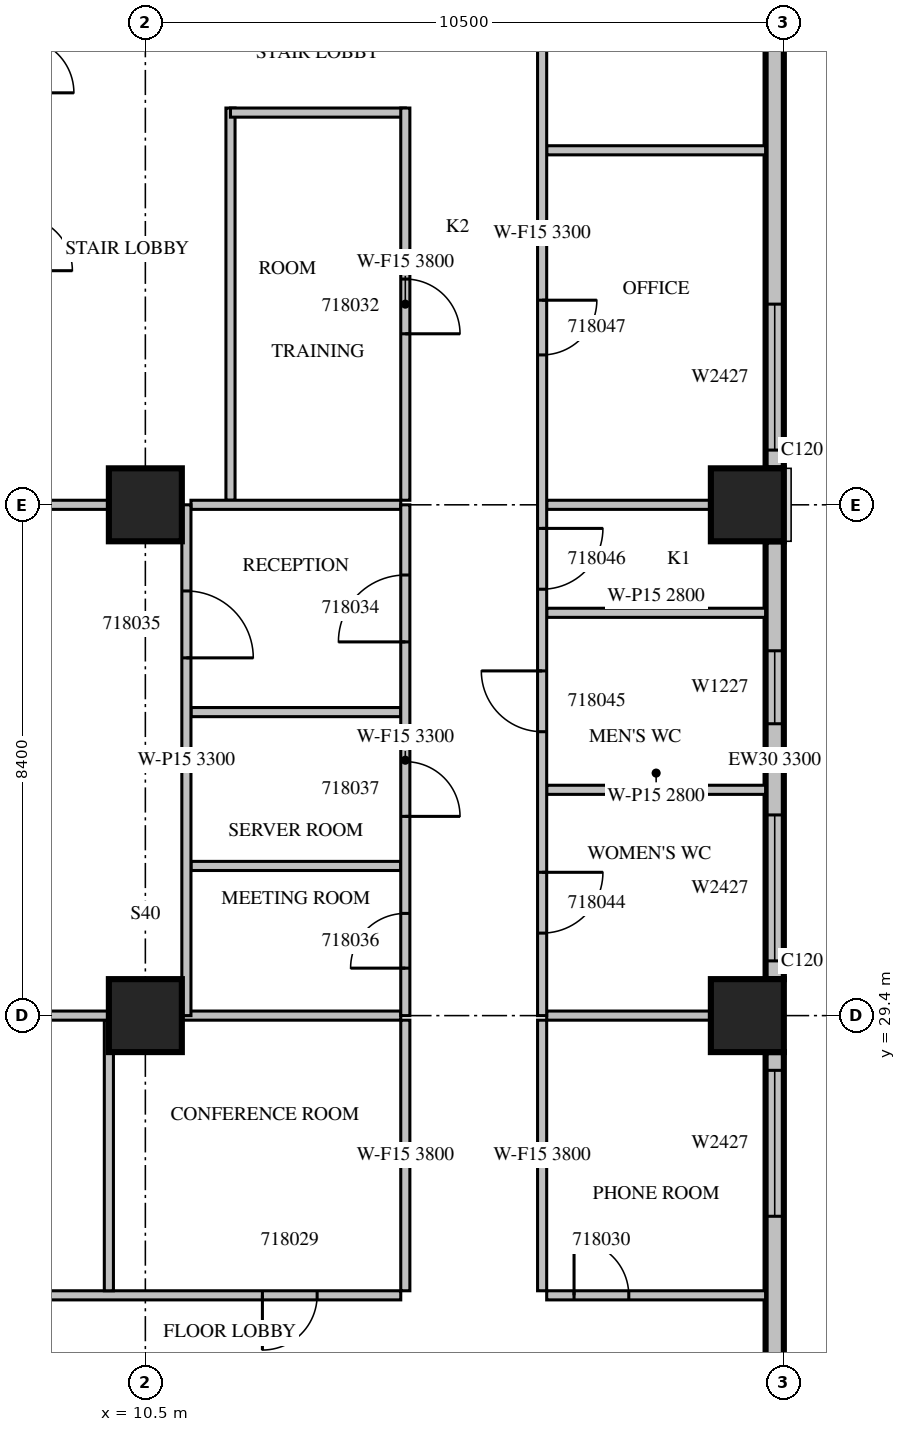
"""IFC4 building model, lengths in metres.
Left out: names, types, materials, properties, quantities, classifications, styles, units other than length and angle.
Written with IfcOpenShell. Run it as: python <this file> out.ifc"""

import sys

from ifc_helpers import new_model, si_unit, direction, frame, frame_2d, origin, origin_2d, place, context, subcontext, project, spatial, rectangle, extrude, source, transform, mapped, element, fill, save


model = new_model("IFC4")
c1 = context("Model", 3, precision=1e-05, world=origin(), true_north=direction((0.0, 1.0)))
c2 = subcontext(c1, "Body", "Model", "MODEL_VIEW")
j1 = project(units=[si_unit("LENGTHUNIT", "METRE"), si_unit("PLANEANGLEUNIT", "RADIAN")], contexts=[c1])
p1 = place(None, origin())
s1 = spatial("IfcSite", under=j1, at=p1, CompositionType="ELEMENT")
p2 = place(p1, origin())
s2 = spatial("IfcBuilding", under=s1, at=p2, CompositionType="ELEMENT")
p3 = place(p2, frame((0.0, 0.0, 86.7)))
s3 = spatial("IfcBuildingStorey", under=s2, at=p3, CompositionType="ELEMENT", Elevation=86.7)
m1 = source(origin(), c2, "Body", "SweptSolid", [
    extrude(rectangle(XDim=1.2, YDim=1.2, at=origin_2d()), origin(), (0.0, 0.0, 1.0), 4.2),
])
for number, where, z_axis, x_axis in (
    (1, (10.5, 29.4, 0.0), (0.0, 0.0, 1.0), (1.0, 0.0, 0.0)),
    (2, (20.4, 29.4, 0.0), (0.0, 0.0, 1.0), (1.0, 0.0, 0.0)),
    (3, (10.5, 37.8, 0.0), (0.0, 0.0, 1.0), (1.0, 0.0, 0.0)),
    (4, (20.4, 37.8, 0.0), (0.0, 0.0, 1.0), (1.0, 0.0, 0.0)),
):
    element("IfcColumn", number, at=place(p3, frame(where, z_axis=z_axis, x_axis=x_axis)), inside=s3, PredefinedType="COLUMN", context=c2, shape_type="MappedRepresentation", body=[
        mapped(m1, transform((0.0, 0.0, 0.0), scale=1.0)),
    ])
m2 = source(origin(), c2, "Body", "SweptSolid", [
    extrude(rectangle(XDim=6.6, YDim=0.3, at=frame_2d((3.3, 0.0))), origin(), (0.0, 0.0, 1.0), 3.8),
])
p4 = place(p3, frame((20.85, 22.2, 0.0), z_axis=(0.0, 0.0, 1.0), x_axis=(0.0, 1.0, 0.0)))
e5 = element("IfcWall", 5, at=p4, inside=s3, PredefinedType="STANDARD", context=c2, shape_type="MappedRepresentation", body=[
    mapped(m2, transform((0.0, 0.0, 0.0), scale=1.0)),
])
m3 = source(origin(), c2, "Body", "SweptSolid", [
    extrude(rectangle(XDim=1.2, YDim=2.7, at=frame_2d((0.6, 1.35))), frame((0.0, 0.16, 0.0), z_axis=(0.0, -1.0, 0.0), x_axis=(1.0, 0.0, 0.0)), (0.0, 0.0, 1.0), 0.32),
])
p5 = place(p4, frame((0.3, 0.0, 0.6)))
e6 = element("IfcOpeningElement", 6, at=p5, cuts=e5, PredefinedType="OPENING", context=c2, shape_type="MappedRepresentation", body=[
    mapped(m3, transform((0.0, 0.0, 0.0), scale=1.0)),
])
m4 = source(origin(), c2, "Body", "SweptSolid", [
    extrude(rectangle(XDim=2.4, YDim=2.7, at=frame_2d((1.2, 1.35))), frame((0.0, 0.16, 0.0), z_axis=(0.0, -1.0, 0.0), x_axis=(1.0, 0.0, 0.0)), (0.0, 0.0, 1.0), 0.32),
])
p6 = place(p4, frame((3.9, 0.0, 0.6)))
e7 = element("IfcOpeningElement", 7, at=p6, cuts=e5, PredefinedType="OPENING", context=c2, shape_type="MappedRepresentation", body=[
    mapped(m4, transform((0.0, 0.0, 0.0), scale=1.0)),
])
m5 = source(origin(), c2, "Body", "SweptSolid", [
    extrude(rectangle(XDim=7.2, YDim=0.3, at=frame_2d((3.6, 0.0))), origin(), (0.0, 0.0, 1.0), 3.3),
])
p7 = place(p3, frame((20.85, 30.0, 0.0), z_axis=(0.0, 0.0, 1.0), x_axis=(0.0, 1.0, 0.0)))
e8 = element("IfcWall", 8, at=p7, inside=s3, PredefinedType="STANDARD", context=c2, shape_type="MappedRepresentation", body=[
    mapped(m5, transform((0.0, 0.0, 0.0), scale=1.0)),
])
p8 = place(p7, frame((0.3, 0.0, 0.6)))
e9 = element("IfcOpeningElement", 9, at=p8, cuts=e8, PredefinedType="OPENING", context=c2, shape_type="MappedRepresentation", body=[
    mapped(m4, transform((0.0, 0.0, 0.0), scale=1.0)),
])
p9 = place(p7, frame((4.199, 0.0, 0.6)))
e10 = element("IfcOpeningElement", 10, at=p9, cuts=e8, PredefinedType="OPENING", context=c2, shape_type="MappedRepresentation", body=[
    mapped(m3, transform((0.0, 0.0, 0.0), scale=1.0)),
])
m6 = source(origin(), c2, "Body", "SweptSolid", [
    extrude(rectangle(XDim=7.2, YDim=0.3, at=frame_2d((3.6, 0.0))), origin(), (0.0, 0.0, 1.0), 3.8),
])
p10 = place(p3, frame((20.85, 38.4, 0.0), z_axis=(0.0, 0.0, 1.0), x_axis=(0.0, 1.0, 0.0)))
e11 = element("IfcWall", 11, at=p10, inside=s3, PredefinedType="STANDARD", context=c2, shape_type="MappedRepresentation", body=[
    mapped(m6, transform((0.0, 0.0, 0.0), scale=1.0)),
])
p11 = place(p10, frame((0.3, 0.0, 0.6)))
e12 = element("IfcOpeningElement", 12, at=p11, cuts=e11, PredefinedType="OPENING", context=c2, shape_type="MappedRepresentation", body=[
    mapped(m4, transform((0.0, 0.0, 0.0), scale=1.0)),
])
m7 = source(origin(), c2, "Body", "SweptSolid", [
    extrude(rectangle(XDim=11.625, YDim=0.15, at=frame_2d((5.812, 0.0))), origin(), (0.0, 0.0, 1.0), 3.8),
])
p12 = place(p3, frame((3.075, 24.8, 0.0), z_axis=(0.0, 0.0, 1.0), x_axis=(1.0, 0.0, 0.0)))
e13 = element("IfcWall", 13, at=p12, inside=s3, PredefinedType="PARTITIONING", context=c2, shape_type="MappedRepresentation", body=[
    mapped(m7, transform((0.0, 0.0, 0.0), scale=1.0)),
])
m8 = source(origin(), c2, "Body", "SweptSolid", [
    extrude(rectangle(XDim=0.9, YDim=2.1, at=frame_2d((0.45, 1.05))), frame((0.0, 0.085, 0.0), z_axis=(0.0, -1.0, 0.0), x_axis=(1.0, 0.0, 0.0)), (0.0, 0.0, 1.0), 0.17),
])
p13 = place(p12, frame((2.663, 0.0, 0.0)))
e14 = element("IfcOpeningElement", 14, at=p13, cuts=e13, PredefinedType="OPENING", context=c2, shape_type="MappedRepresentation", body=[
    mapped(m8, transform((0.0, 0.0, 0.0), scale=1.0)),
])
p14 = place(p12, frame((9.35, 0.0, 0.0)))
e15 = element("IfcOpeningElement", 15, at=p14, cuts=e13, PredefinedType="OPENING", context=c2, shape_type="MappedRepresentation", body=[
    mapped(m8, transform((0.0, 0.0, 0.0), scale=1.0)),
])
m9 = source(origin(), c2, "Body", "SweptSolid", [
    extrude(rectangle(XDim=3.6, YDim=0.15, at=frame_2d((1.8, 0.0))), origin(), (0.0, 0.0, 1.0), 3.8),
])
p15 = place(p3, frame((17.1, 24.8, 0.0), z_axis=(0.0, 0.0, 1.0), x_axis=(1.0, 0.0, 0.0)))
e16 = element("IfcWall", 16, at=p15, inside=s3, PredefinedType="PARTITIONING", context=c2, shape_type="MappedRepresentation", body=[
    mapped(m9, transform((0.0, 0.0, 0.0), scale=1.0)),
])
p16 = place(p15, frame((0.45, 0.0, 0.0)))
e17 = element("IfcOpeningElement", 17, at=p16, cuts=e16, PredefinedType="OPENING", context=c2, shape_type="MappedRepresentation", body=[
    mapped(m8, transform((0.0, 0.0, 0.0), scale=1.0)),
])
m10 = source(origin(), c2, "Body", "SweptSolid", [
    extrude(rectangle(XDim=4.45, YDim=0.15, at=frame_2d((2.225, 0.0))), origin(), (0.0, 0.0, 1.0), 3.8),
])
for number, where, z_axis, x_axis in (
    (18, (9.9, 24.875, 0.0), (0.0, 0.0, 1.0), (0.0, 1.0, 0.0)),
    (19, (14.775, 24.875, 0.0), (0.0, 0.0, 1.0), (0.0, 1.0, 0.0)),
    (20, (17.025, 29.325, 0.0), (0.0, 0.0, 1.0), (0.0, -1.0, 0.0)),
):
    element("IfcWall", number, at=place(p3, frame(where, z_axis=z_axis, x_axis=x_axis)), inside=s3, PredefinedType="PARTITIONING", context=c2, shape_type="MappedRepresentation", body=[
        mapped(m10, transform((0.0, 0.0, 0.0), scale=1.0)),
    ])
m11 = source(origin(), c2, "Body", "SweptSolid", [
    extrude(rectangle(XDim=6.826, YDim=0.15, at=frame_2d((3.413, 0.0))), origin(), (0.0, 0.0, 1.0), 3.8),
])
p17 = place(p3, frame((9.901, 29.4, 0.0), z_axis=(0.0, 0.0, 1.0), x_axis=(-1.0, 0.0, 0.0)))
e21 = element("IfcWall", 21, at=p17, inside=s3, PredefinedType="PARTITIONING", context=c2, shape_type="MappedRepresentation", body=[
    mapped(m11, transform((0.0, 0.0, 0.0), scale=1.0)),
])
m12 = source(origin(), c2, "Body", "SweptSolid", [
    extrude(rectangle(XDim=3.601, YDim=0.15, at=frame_2d((1.8, 0.0))), origin(), (0.0, 0.0, 1.0), 3.8),
])
p18 = place(p3, frame((14.7, 29.4, 0.0), z_axis=(0.0, 0.0, 1.0), x_axis=(-1.0, 0.0, 0.0)))
e22 = element("IfcWall", 22, at=p18, inside=s3, PredefinedType="PARTITIONING", context=c2, shape_type="MappedRepresentation", body=[
    mapped(m12, transform((0.0, 0.0, 0.0), scale=1.0)),
])
m13 = source(origin(), c2, "Body", "SweptSolid", [
    extrude(rectangle(XDim=2.701, YDim=0.15, at=frame_2d((1.351, 0.0))), origin(), (0.0, 0.0, 1.0), 3.8),
])
p19 = place(p3, frame((19.801, 29.4, 0.0), z_axis=(0.0, 0.0, 1.0), x_axis=(-1.0, 0.0, 0.0)))
e23 = element("IfcWall", 23, at=p19, inside=s3, PredefinedType="PARTITIONING", context=c2, shape_type="MappedRepresentation", body=[
    mapped(m13, transform((0.0, 0.0, 0.0), scale=1.0)),
])
m14 = source(origin(), c2, "Body", "SweptSolid", [
    extrude(rectangle(XDim=6.45, YDim=0.15, at=frame_2d((3.225, 0.0))), origin(), (0.0, 0.0, 1.0), 3.8),
])
p20 = place(p3, frame((11.9, 44.325, 0.0), z_axis=(0.0, 0.0, 1.0), x_axis=(0.0, -1.0, 0.0)))
e24 = element("IfcWall", 24, at=p20, inside=s3, PredefinedType="PARTITIONING", context=c2, shape_type="MappedRepresentation", body=[
    mapped(m14, transform((0.0, 0.0, 0.0), scale=1.0)),
])
m15 = source(origin(), c2, "Body", "SweptSolid", [
    extrude(rectangle(XDim=2.875, YDim=0.15, at=frame_2d((1.438, 0.0))), origin(), (0.0, 0.0, 1.0), 3.8),
])
p21 = place(p3, frame((14.775, 44.25, 0.0), z_axis=(0.0, 0.0, 1.0), x_axis=(-1.0, 0.0, 0.0)))
e25 = element("IfcWall", 25, at=p21, inside=s3, PredefinedType="PARTITIONING", context=c2, shape_type="MappedRepresentation", body=[
    mapped(m15, transform((0.0, 0.0, 0.0), scale=1.0)),
])
p22 = place(p3, frame((14.775, 37.875, 0.0), z_axis=(0.0, 0.0, 1.0), x_axis=(0.0, 1.0, 0.0)))
e26 = element("IfcWall", 26, at=p22, inside=s3, PredefinedType="PARTITIONING", context=c2, shape_type="MappedRepresentation", body=[
    mapped(m14, transform((0.0, 0.0, 0.0), scale=1.0)),
])
p23 = place(p22, frame((2.737, 0.0, 0.0)))
e27 = element("IfcOpeningElement", 27, at=p23, cuts=e26, PredefinedType="OPENING", context=c2, shape_type="MappedRepresentation", body=[
    mapped(m8, transform((0.0, 0.0, 0.0), scale=1.0)),
])
m16 = source(origin(), c2, "Body", "SweptSolid", [
    extrude(rectangle(XDim=3.45, YDim=0.15, at=frame_2d((1.725, 0.0))), origin(), (0.0, 0.0, 1.0), 3.8),
])
for number, where, z_axis, x_axis in (
    (28, (14.7, 31.861, 0.0), (0.0, 0.0, 1.0), (-1.0, 0.0, 0.0)),
    (29, (14.7, 34.391, 0.0), (0.0, 0.0, 1.0), (-1.0, 0.0, 0.0)),
):
    element("IfcWall", number, at=place(p3, frame(where, z_axis=z_axis, x_axis=x_axis)), inside=s3, PredefinedType="PARTITIONING", context=c2, shape_type="MappedRepresentation", body=[
        mapped(m16, transform((0.0, 0.0, 0.0), scale=1.0)),
    ])
m17 = source(origin(), c2, "Body", "SweptSolid", [
    extrude(rectangle(XDim=8.702, YDim=0.15, at=frame_2d((4.351, 0.0))), origin(), (0.0, 0.0, 1.0), 3.8),
])
p24 = place(p3, frame((9.901, 37.8, 0.0), z_axis=(0.0, 0.0, 1.0), x_axis=(-1.0, 0.0, 0.0)))
e30 = element("IfcWall", 30, at=p24, inside=s3, PredefinedType="PARTITIONING", context=c2, shape_type="MappedRepresentation", body=[
    mapped(m17, transform((0.0, 0.0, 0.0), scale=1.0)),
])
p25 = place(p3, frame((14.7, 37.8, 0.0), z_axis=(0.0, 0.0, 1.0), x_axis=(-1.0, 0.0, 0.0)))
e31 = element("IfcWall", 31, at=p25, inside=s3, PredefinedType="PARTITIONING", context=c2, shape_type="MappedRepresentation", body=[
    mapped(m16, transform((0.0, 0.0, 0.0), scale=1.0)),
])
m18 = source(origin(), c2, "Body", "SweptSolid", [
    extrude(rectangle(XDim=8.4, YDim=0.15, at=frame_2d((4.2, 0.0))), origin(), (0.0, 0.0, 1.0), 3.3),
])
p26 = place(p3, frame((11.175, 29.4, 0.0), z_axis=(0.0, 0.0, 1.0), x_axis=(0.0, 1.0, 0.0)))
e32 = element("IfcWall", 32, at=p26, inside=s3, PredefinedType="PARTITIONING", context=c2, shape_type="MappedRepresentation", body=[
    mapped(m18, transform((0.0, 0.0, 0.0), scale=1.0)),
])
m19 = source(origin(), c2, "Body", "SweptSolid", [
    extrude(rectangle(XDim=1.1, YDim=2.1, at=frame_2d((0.55, 1.05))), frame((0.0, 0.085, 0.0), z_axis=(0.0, -1.0, 0.0), x_axis=(1.0, 0.0, 0.0)), (0.0, 0.0, 1.0), 0.17),
])
p27 = place(p26, frame((5.883, 0.0, 0.0)))
e33 = element("IfcOpeningElement", 33, at=p27, cuts=e32, PredefinedType="OPENING", context=c2, shape_type="MappedRepresentation", body=[
    mapped(m19, transform((0.0, 0.0, 0.0), scale=1.0)),
])
m20 = source(origin(), c2, "Body", "SweptSolid", [
    extrude(rectangle(XDim=3.6, YDim=0.15, at=frame_2d((1.8, 0.0))), origin(), (0.0, 0.0, 1.0), 2.8),
])
for number, where, z_axis, x_axis in (
    (34, (17.1, 33.113, 0.0), (0.0, 0.0, 1.0), (1.0, 0.0, 0.0)),
    (35, (17.1, 36.024, 0.0), (0.0, 0.0, 1.0), (1.0, 0.0, 0.0)),
):
    element("IfcWall", number, at=place(p3, frame(where, z_axis=z_axis, x_axis=x_axis)), inside=s3, PredefinedType="PARTITIONING", context=c2, shape_type="MappedRepresentation", body=[
        mapped(m20, transform((0.0, 0.0, 0.0), scale=1.0)),
    ])
p28 = place(p3, frame((17.1, 43.63, 0.0), z_axis=(0.0, 0.0, 1.0), x_axis=(1.0, 0.0, 0.0)))
e36 = element("IfcWall", 36, at=p28, inside=s3, PredefinedType="PARTITIONING", context=c2, shape_type="MappedRepresentation", body=[
    mapped(m9, transform((0.0, 0.0, 0.0), scale=1.0)),
])
p29 = place(p3, frame((19.801, 37.8, 0.0), z_axis=(0.0, 0.0, 1.0), x_axis=(-1.0, 0.0, 0.0)))
e37 = element("IfcWall", 37, at=p29, inside=s3, PredefinedType="PARTITIONING", context=c2, shape_type="MappedRepresentation", body=[
    mapped(m13, transform((0.0, 0.0, 0.0), scale=1.0)),
])
p30 = place(p3, frame((14.775, 29.4, 0.0), z_axis=(0.0, 0.0, 1.0), x_axis=(0.0, 1.0, 0.0)))
e38 = element("IfcWall", 38, at=p30, inside=s3, PredefinedType="PARTITIONING", context=c2, shape_type="MappedRepresentation", body=[
    mapped(m18, transform((0.0, 0.0, 0.0), scale=1.0)),
])
p31 = place(p30, frame((6.146, 0.0, 0.0)))
e39 = element("IfcOpeningElement", 39, at=p31, cuts=e38, PredefinedType="OPENING", context=c2, shape_type="MappedRepresentation", body=[
    mapped(m19, transform((0.0, 0.0, 0.0), scale=1.0)),
])
p32 = place(p30, frame((0.781, 0.0, 0.0)))
e40 = element("IfcOpeningElement", 40, at=p32, cuts=e38, PredefinedType="OPENING", context=c2, shape_type="MappedRepresentation", body=[
    mapped(m8, transform((0.0, 0.0, 0.0), scale=1.0)),
])
p33 = place(p30, frame((3.276, 0.0, 0.0)))
e41 = element("IfcOpeningElement", 41, at=p33, cuts=e38, PredefinedType="OPENING", context=c2, shape_type="MappedRepresentation", body=[
    mapped(m8, transform((0.0, 0.0, 0.0), scale=1.0)),
])
p34 = place(p3, frame((17.025, 55.14, 0.0), z_axis=(0.0, 0.0, 1.0), x_axis=(0.0, -1.0, 0.0)))
e42 = element("IfcWall", 42, at=p34, inside=s3, PredefinedType="PARTITIONING", context=c2, shape_type="SweptSolid", body=[
    extrude(rectangle(XDim=25.74, YDim=0.15, at=frame_2d((12.87, 0.0))), origin(), (0.0, 0.0, 1.0), 3.3),
])
m21 = source(origin(), c2, "Body", "SweptSolid", [
    extrude(rectangle(XDim=1.0, YDim=2.1, at=frame_2d((0.5, 1.05))), frame((0.0, 0.085, 0.0), z_axis=(0.0, -1.0, 0.0), x_axis=(1.0, 0.0, 0.0)), (0.0, 0.0, 1.0), 0.17),
])
p35 = place(p34, frame((23.383, 0.0, 0.0)))
e43 = element("IfcOpeningElement", 43, at=p35, cuts=e42, PredefinedType="OPENING", context=c2, shape_type="MappedRepresentation", body=[
    mapped(m21, transform((0.0, 0.0, 0.0), scale=1.0)),
])
p36 = place(p34, frame((20.071, 0.0, 0.0)))
e44 = element("IfcOpeningElement", 44, at=p36, cuts=e42, PredefinedType="OPENING", context=c2, shape_type="MappedRepresentation", body=[
    mapped(m21, transform((0.0, 0.0, 0.0), scale=1.0)),
])
p37 = place(p34, frame((17.728, 0.0, 0.0)))
e45 = element("IfcOpeningElement", 45, at=p37, cuts=e42, PredefinedType="OPENING", context=c2, shape_type="MappedRepresentation", body=[
    mapped(m21, transform((0.0, 0.0, 0.0), scale=1.0)),
])
p38 = place(p34, frame((13.975, 0.0, 0.0)))
e46 = element("IfcOpeningElement", 46, at=p38, cuts=e42, PredefinedType="OPENING", context=c2, shape_type="MappedRepresentation", body=[
    mapped(m8, transform((0.0, 0.0, 0.0), scale=1.0)),
])
p39 = place(p34, frame((8.182, 0.0, 0.0)))
e47 = element("IfcOpeningElement", 47, at=p39, cuts=e42, PredefinedType="OPENING", context=c2, shape_type="MappedRepresentation", body=[
    mapped(m8, transform((0.0, 0.0, 0.0), scale=1.0)),
])
p40 = place(p34, frame((2.39, 0.0, 0.0)))
e48 = element("IfcOpeningElement", 48, at=p40, cuts=e42, PredefinedType="OPENING", context=c2, shape_type="MappedRepresentation", body=[
    mapped(m8, transform((0.0, 0.0, 0.0), scale=1.0)),
])
m22 = source(origin(), c2, "Body", "SweptSolid", [
    extrude(rectangle(XDim=2.4, YDim=2.7, at=frame_2d((1.2, 1.35))), frame((0.0, 0.03, 0.0), z_axis=(0.0, -1.0, 0.0), x_axis=(1.0, 0.0, 0.0)), (0.0, 0.0, 1.0), 0.06),
])
p41 = place(p6, origin())
e49 = element("IfcWindow", 49, at=p41, inside=s3, PartitioningType="SINGLE_PANEL", PredefinedType="WINDOW", context=c2, shape_type="MappedRepresentation", body=[
    mapped(m22, transform((0.0, 0.0, 0.0), scale=1.0)),
])
fill(e7, e49)
p42 = place(p8, origin())
e50 = element("IfcWindow", 50, at=p42, inside=s3, PartitioningType="SINGLE_PANEL", PredefinedType="WINDOW", context=c2, shape_type="MappedRepresentation", body=[
    mapped(m22, transform((0.0, 0.0, 0.0), scale=1.0)),
])
fill(e9, e50)
m23 = source(origin(), c2, "Body", "SweptSolid", [
    extrude(rectangle(XDim=1.2, YDim=2.7, at=frame_2d((0.6, 1.35))), frame((0.0, 0.03, 0.0), z_axis=(0.0, -1.0, 0.0), x_axis=(1.0, 0.0, 0.0)), (0.0, 0.0, 1.0), 0.06),
])
p43 = place(p9, origin())
e51 = element("IfcWindow", 51, at=p43, inside=s3, PartitioningType="SINGLE_PANEL", PredefinedType="WINDOW", context=c2, shape_type="MappedRepresentation", body=[
    mapped(m23, transform((0.0, 0.0, 0.0), scale=1.0)),
])
fill(e10, e51)
p44 = place(p11, origin())
e52 = element("IfcWindow", 52, at=p44, inside=s3, PartitioningType="SINGLE_PANEL", PredefinedType="WINDOW", context=c2, shape_type="MappedRepresentation", body=[
    mapped(m22, transform((0.0, 0.0, 0.0), scale=1.0)),
])
fill(e12, e52)
m24 = source(origin(), c2, "Body", "SweptSolid", [
    extrude(rectangle(XDim=0.9, YDim=2.1, at=frame_2d((0.45, 1.05))), frame((0.0, 0.025, 0.0), z_axis=(0.0, -1.0, 0.0), x_axis=(1.0, 0.0, 0.0)), (0.0, 0.0, 1.0), 0.05),
])
p45 = place(p14, origin())
e53 = element("IfcDoor", 53, at=p45, inside=s3, OperationType="SINGLE_SWING_RIGHT", PredefinedType="DOOR", context=c2, shape_type="MappedRepresentation", body=[
    mapped(m24, transform((0.0, 0.0, 0.0), scale=1.0)),
])
fill(e15, e53)
p46 = place(p16, origin())
e54 = element("IfcDoor", 54, at=p46, inside=s3, OperationType="SINGLE_SWING_LEFT", PredefinedType="DOOR", context=c2, shape_type="MappedRepresentation", body=[
    mapped(m24, transform((0.0, 0.0, 0.0), scale=1.0)),
])
fill(e17, e54)
p47 = place(p23, origin())
e55 = element("IfcDoor", 55, at=p47, inside=s3, OperationType="SINGLE_SWING_RIGHT", PredefinedType="DOOR", context=c2, shape_type="MappedRepresentation", body=[
    mapped(m24, transform((0.0, 0.0, 0.0), scale=1.0)),
])
fill(e27, e55)
m25 = source(origin(), c2, "Body", "SweptSolid", [
    extrude(rectangle(XDim=1.1, YDim=2.1, at=frame_2d((0.55, 1.05))), frame((0.0, 0.025, 0.0), z_axis=(0.0, -1.0, 0.0), x_axis=(1.0, 0.0, 0.0)), (0.0, 0.0, 1.0), 0.05),
])
p48 = place(p31, origin())
e56 = element("IfcDoor", 56, at=p48, inside=s3, OperationType="SINGLE_SWING_LEFT", PredefinedType="DOOR", context=c2, shape_type="MappedRepresentation", body=[
    mapped(m25, transform((0.0, 0.0, 0.0), scale=1.0)),
])
fill(e39, e56)
p49 = place(p27, origin())
e57 = element("IfcDoor", 57, at=p49, inside=s3, OperationType="SINGLE_SWING_RIGHT", PredefinedType="DOOR", context=c2, shape_type="MappedRepresentation", body=[
    mapped(m25, transform((0.0, 0.0, 0.0), scale=1.0)),
])
fill(e33, e57)
p50 = place(p32, origin())
e58 = element("IfcDoor", 58, at=p50, inside=s3, OperationType="SINGLE_SWING_LEFT", PredefinedType="DOOR", context=c2, shape_type="MappedRepresentation", body=[
    mapped(m24, transform((0.0, 0.0, 0.0), scale=1.0)),
])
fill(e40, e58)
p51 = place(p33, origin())
e59 = element("IfcDoor", 59, at=p51, inside=s3, OperationType="SINGLE_SWING_RIGHT", PredefinedType="DOOR", context=c2, shape_type="MappedRepresentation", body=[
    mapped(m24, transform((0.0, 0.0, 0.0), scale=1.0)),
])
fill(e41, e59)
m26 = source(origin(), c2, "Body", "SweptSolid", [
    extrude(rectangle(XDim=1.0, YDim=2.1, at=frame_2d((0.5, 1.05))), frame((0.0, 0.025, 0.0), z_axis=(0.0, -1.0, 0.0), x_axis=(1.0, 0.0, 0.0)), (0.0, 0.0, 1.0), 0.05),
])
p52 = place(p35, origin())
e60 = element("IfcDoor", 60, at=p52, inside=s3, OperationType="SINGLE_SWING_LEFT", PredefinedType="DOOR", context=c2, shape_type="MappedRepresentation", body=[
    mapped(m26, transform((0.0, 0.0, 0.0), scale=1.0)),
])
fill(e43, e60)
p53 = place(p36, origin())
e61 = element("IfcDoor", 61, at=p53, inside=s3, OperationType="SINGLE_SWING_RIGHT", PredefinedType="DOOR", context=c2, shape_type="MappedRepresentation", body=[
    mapped(m26, transform((0.0, 0.0, 0.0), scale=1.0)),
])
fill(e44, e61)
p54 = place(p37, origin())
e62 = element("IfcDoor", 62, at=p54, inside=s3, OperationType="SINGLE_SWING_LEFT", PredefinedType="DOOR", context=c2, shape_type="MappedRepresentation", body=[
    mapped(m26, transform((0.0, 0.0, 0.0), scale=1.0)),
])
fill(e45, e62)
p55 = place(p38, origin())
e63 = element("IfcDoor", 63, at=p55, inside=s3, OperationType="SINGLE_SWING_LEFT", PredefinedType="DOOR", context=c2, shape_type="MappedRepresentation", body=[
    mapped(m24, transform((0.0, 0.0, 0.0), scale=1.0)),
])
fill(e46, e63)
save(model, sys.argv[1])
